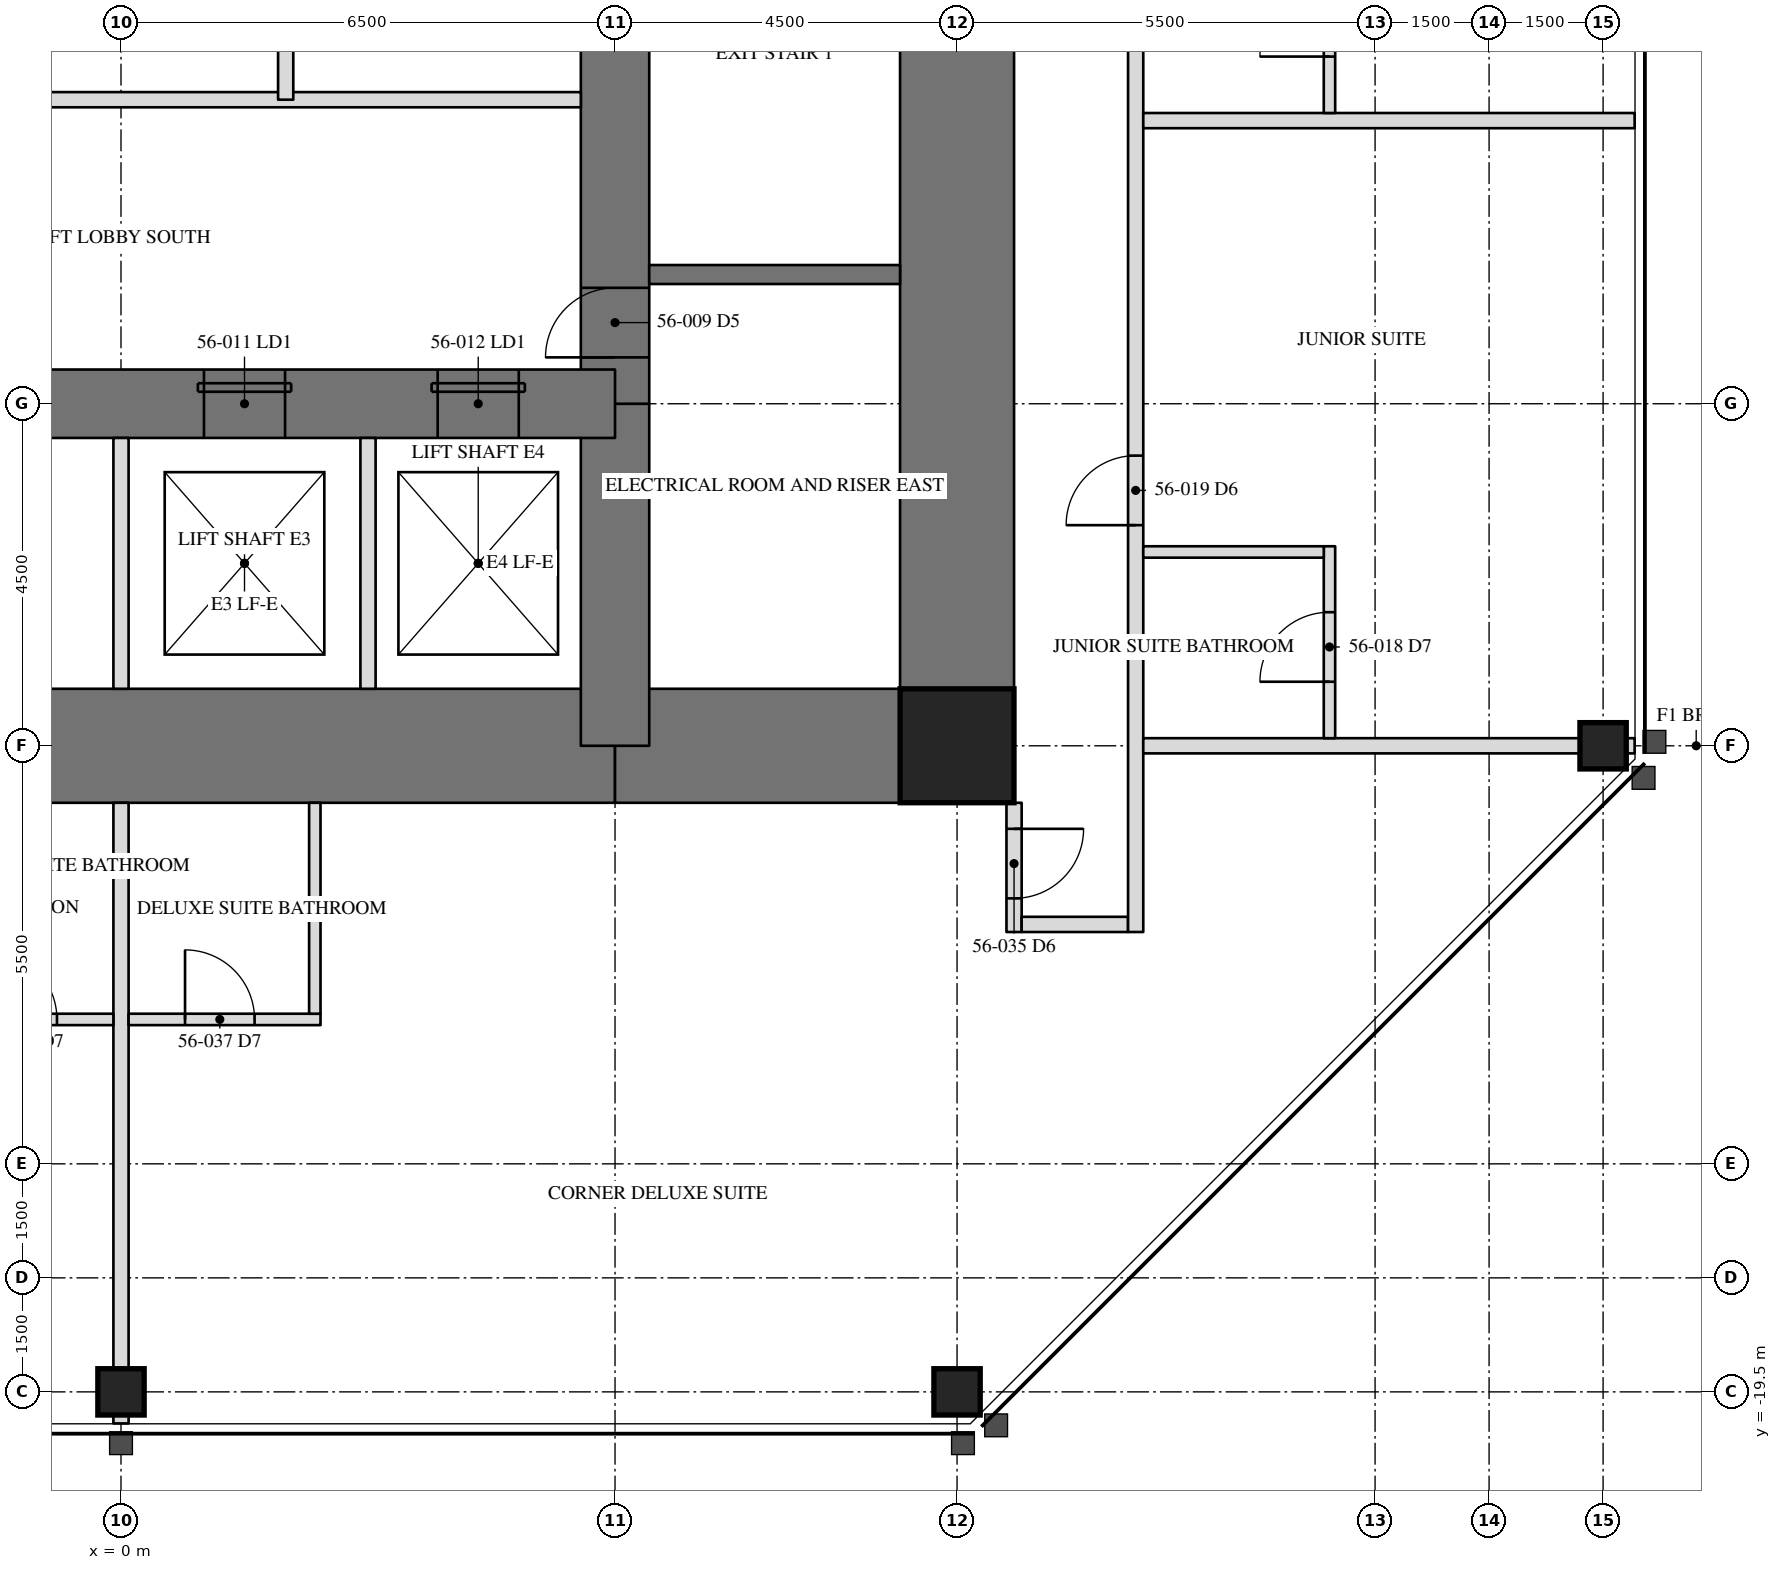
"""IFC4 building model, lengths in metres.
Left out: names, types, materials, properties, quantities, classifications, styles, units other than length and angle.
Written with IfcOpenShell. Run it as: python <this file> out.ifc"""

import sys

from ifc_helpers import new_model, si_unit, direction, frame, frame_2d, origin, origin_2d, place, context, subcontext, project, spatial, rectangle, hollow_rectangle, extrude, element, fill, save


model = new_model("IFC4")
c1 = context("Model", 3, precision=1e-05, world=origin(), true_north=direction((0.0, 1.0)))
c2 = subcontext(c1, "Body", "Model", "MODEL_VIEW")
j1 = project(units=[si_unit("LENGTHUNIT", "METRE"), si_unit("PLANEANGLEUNIT", "RADIAN")], contexts=[c1])
p1 = place(None, origin())
s1 = spatial("IfcSite", under=j1, at=p1, CompositionType="ELEMENT")
p2 = place(p1, origin())
s2 = spatial("IfcBuilding", under=s1, at=p2, CompositionType="ELEMENT")
p3 = place(p2, frame((0.0, 0.0, 232.7)))
s3 = spatial("IfcBuildingStorey", under=s2, at=p3, CompositionType="ELEMENT", Elevation=232.7)
for number, where, z_axis, x_axis in (
    (1, (0.0, -19.5, 0.0), (0.0, 0.0, 1.0), (1.0, 0.0, 0.0)),
    (2, (11.0, -19.5, 0.0), (0.0, 0.0, 1.0), (1.0, 0.0, 0.0)),
    (3, (19.5, -11.0, 0.0), (0.0, 0.0, 1.0), (0.0, 1.0, 0.0)),
):
    element("IfcColumn", number, at=place(p3, frame(where, z_axis=z_axis, x_axis=x_axis)), inside=s3, PredefinedType="COLUMN", context=c2, shape_type="SweptSolid", body=[
        extrude(hollow_rectangle(XDim=0.61, YDim=0.61, WallThickness=0.076, at=origin_2d()), origin(), (0.0, 0.0, 1.0), 3.5),
    ])
p4 = place(p3, frame((11.0, -11.0, 0.0), z_axis=(0.0, 0.0, 1.0), x_axis=(0.0, 1.0, 0.0)))
e4 = element("IfcWall", 4, at=p4, inside=s3, PredefinedType="SHEAR", context=c2, shape_type="SweptSolid", body=[
    extrude(rectangle(XDim=22.0, YDim=1.5, at=frame_2d((11.0, 0.0))), origin(), (0.0, 0.0, 1.0), 3.5),
])
p5 = place(p4, frame((15.393, 0.0, 0.0)))
e5 = element("IfcOpeningElement", 5, at=p5, cuts=e4, PredefinedType="OPENING", context=c2, shape_type="SweptSolid", body=[
    extrude(rectangle(XDim=0.915, YDim=2.134, at=frame_2d((0.458, 1.067))), frame((0.0, 0.76, 0.0), z_axis=(0.0, -1.0, 0.0), x_axis=(1.0, 0.0, 0.0)), (0.0, 0.0, 1.0), 1.52),
])
p6 = place(p3, frame((-6.5, -11.0, 0.0), z_axis=(0.0, 0.0, 1.0), x_axis=(1.0, 0.0, 0.0)))
e6 = element("IfcWall", 6, at=p6, inside=s3, PredefinedType="SHEAR", context=c2, shape_type="SweptSolid", body=[
    extrude(rectangle(XDim=13.0, YDim=1.5, at=frame_2d((6.5, 0.0))), origin(), (0.0, 0.0, 1.0), 3.5),
])
p7 = place(p3, frame((6.5, -11.0, 0.0), z_axis=(0.0, 0.0, 1.0), x_axis=(1.0, 0.0, 0.0)))
e7 = element("IfcWall", 7, at=p7, inside=s3, PredefinedType="SHEAR", context=c2, shape_type="SweptSolid", body=[
    extrude(rectangle(XDim=4.5, YDim=1.5, at=frame_2d((2.25, 0.0))), origin(), (0.0, 0.0, 1.0), 3.5),
])
p8 = place(p3, frame((6.5, -11.0, 0.0), z_axis=(0.0, 0.0, 1.0), x_axis=(0.0, 1.0, 0.0)))
e8 = element("IfcWall", 8, at=p8, inside=s3, PredefinedType="SHEAR", context=c2, shape_type="SweptSolid", body=[
    extrude(rectangle(XDim=4.5, YDim=0.9, at=frame_2d((2.25, 0.0))), origin(), (0.0, 0.0, 1.0), 3.5),
])
p9 = place(p3, frame((6.5, -6.5, 0.0), z_axis=(0.0, 0.0, 1.0), x_axis=(0.0, 1.0, 0.0)))
e9 = element("IfcWall", 9, at=p9, inside=s3, PredefinedType="SHEAR", context=c2, shape_type="SweptSolid", body=[
    extrude(rectangle(XDim=13.0, YDim=0.9, at=frame_2d((6.5, 0.0))), origin(), (0.0, 0.0, 1.0), 3.5),
])
p10 = place(p9, frame((10.893, 0.0, 0.0)))
e10 = element("IfcOpeningElement", 10, at=p10, cuts=e9, PredefinedType="OPENING", context=c2, shape_type="SweptSolid", body=[
    extrude(rectangle(XDim=0.915, YDim=2.134, at=frame_2d((0.458, 1.067))), frame((0.0, 0.46, 0.0), z_axis=(0.0, -1.0, 0.0), x_axis=(1.0, 0.0, 0.0)), (0.0, 0.0, 1.0), 0.92),
])
p11 = place(p9, frame((0.61, 0.0, 0.0)))
e11 = element("IfcOpeningElement", 11, at=p11, cuts=e9, PredefinedType="OPENING", context=c2, shape_type="SweptSolid", body=[
    extrude(rectangle(XDim=0.915, YDim=2.134, at=frame_2d((0.458, 1.067))), frame((0.0, 0.46, 0.0), z_axis=(0.0, -1.0, 0.0), x_axis=(1.0, 0.0, 0.0)), (0.0, 0.0, 1.0), 0.92),
])
p12 = place(p3, frame((-6.5, -6.5, 0.0), z_axis=(0.0, 0.0, 1.0), x_axis=(1.0, 0.0, 0.0)))
e12 = element("IfcWall", 12, at=p12, inside=s3, PredefinedType="SHEAR", context=c2, shape_type="SweptSolid", body=[
    extrude(rectangle(XDim=13.0, YDim=0.9, at=frame_2d((6.5, 0.0))), origin(), (0.0, 0.0, 1.0), 3.5),
])
p13 = place(p12, frame((7.592, 0.0, 0.0)))
e13 = element("IfcOpeningElement", 13, at=p13, cuts=e12, PredefinedType="OPENING", context=c2, shape_type="SweptSolid", body=[
    extrude(rectangle(XDim=1.067, YDim=2.134, at=frame_2d((0.533, 1.067))), frame((0.0, 0.46, 0.0), z_axis=(0.0, -1.0, 0.0), x_axis=(1.0, 0.0, 0.0)), (0.0, 0.0, 1.0), 0.92),
])
p14 = place(p12, frame((10.667, 0.0, 0.0)))
e14 = element("IfcOpeningElement", 14, at=p14, cuts=e12, PredefinedType="OPENING", context=c2, shape_type="SweptSolid", body=[
    extrude(rectangle(XDim=1.067, YDim=2.134, at=frame_2d((0.533, 1.067))), frame((0.0, 0.46, 0.0), z_axis=(0.0, -1.0, 0.0), x_axis=(1.0, 0.0, 0.0)), (0.0, 0.0, 1.0), 0.92),
])
p15 = place(p12, frame((0.667, 0.0, 0.0)))
e15 = element("IfcOpeningElement", 15, at=p15, cuts=e12, PredefinedType="OPENING", context=c2, shape_type="SweptSolid", body=[
    extrude(rectangle(XDim=0.915, YDim=2.134, at=frame_2d((0.458, 1.067))), frame((0.0, 0.46, 0.0), z_axis=(0.0, -1.0, 0.0), x_axis=(1.0, 0.0, 0.0)), (0.0, 0.0, 1.0), 0.92),
])
p16 = place(p12, frame((3.742, 0.0, 0.0)))
e16 = element("IfcOpeningElement", 16, at=p16, cuts=e12, PredefinedType="OPENING", context=c2, shape_type="SweptSolid", body=[
    extrude(rectangle(XDim=0.915, YDim=2.134, at=frame_2d((0.458, 1.067))), frame((0.0, 0.46, 0.0), z_axis=(0.0, -1.0, 0.0), x_axis=(1.0, 0.0, 0.0)), (0.0, 0.0, 1.0), 0.92),
])
p17 = place(p3, frame((11.0, -11.0, 0.0), z_axis=(0.0, 0.0, 1.0), x_axis=(1.0, 0.0, 0.0)))
e17 = element("IfcColumn", 17, at=p17, inside=s3, PredefinedType="COLUMN", context=c2, shape_type="SweptSolid", body=[
    extrude(hollow_rectangle(XDim=1.499, YDim=1.499, WallThickness=0.102, at=origin_2d()), origin(), (0.0, 0.0, 1.0), 3.5),
])
p18 = place(p3, frame((6.95, -4.8, 0.0), z_axis=(0.0, 0.0, 1.0), x_axis=(1.0, 0.0, 0.0)))
e18 = element("IfcWall", 18, at=p18, inside=s3, PredefinedType="SOLIDWALL", context=c2, shape_type="SweptSolid", body=[
    extrude(rectangle(XDim=3.3, YDim=0.25, at=frame_2d((1.65, 0.0))), origin(), (0.0, 0.0, 1.0), 3.31),
])
p19 = place(p3, frame((6.05, -2.5, 0.0), z_axis=(0.0, 0.0, 1.0), x_axis=(-1.0, 0.0, 0.0)))
e19 = element("IfcWall", 19, at=p19, inside=s3, PredefinedType="PARTITIONING", context=c2, shape_type="SweptSolid", body=[
    extrude(rectangle(XDim=12.1, YDim=0.2, at=frame_2d((6.05, 0.0))), origin(), (0.0, 0.0, 1.0), 3.31),
])
for number, where, z_axis, x_axis in (
    (20, (0.0, -10.25, 0.0), (0.0, 0.0, 1.0), (0.0, 1.0, 0.0)),
    (21, (3.25, -10.25, 0.0), (0.0, 0.0, 1.0), (0.0, 1.0, 0.0)),
):
    element("IfcWall", number, at=place(p3, frame(where, z_axis=z_axis, x_axis=x_axis)), inside=s3, PredefinedType="PARTITIONING", context=c2, shape_type="SweptSolid", body=[
        extrude(rectangle(XDim=3.3, YDim=0.2, at=frame_2d((1.65, 0.0))), origin(), (0.0, 0.0, 1.0), 3.31),
    ])
p20 = place(p3, frame((2.167, -2.5, 0.0), z_axis=(0.0, 0.0, 1.0), x_axis=(0.0, 1.0, 0.0)))
e22 = element("IfcWall", 22, at=p20, inside=s3, PredefinedType="PARTITIONING", context=c2, shape_type="SweptSolid", body=[
    extrude(rectangle(XDim=5.0, YDim=0.2, at=frame_2d((2.5, 0.0))), origin(), (0.0, 0.0, 1.0), 3.31),
])
p21 = place(p3, frame((11.75, -11.75, 0.0), z_axis=(0.0, 0.0, 1.0), x_axis=(0.0, -1.0, 0.0)))
e23 = element("IfcWall", 23, at=p21, inside=s3, PredefinedType="PARTITIONING", context=c2, shape_type="SweptSolid", body=[
    extrude(rectangle(XDim=1.7, YDim=0.2, at=frame_2d((0.85, 0.0))), origin(), (0.0, 0.0, 1.0), 3.31),
])
p22 = place(p21, frame((0.343, 0.0, 0.0)))
e24 = element("IfcOpeningElement", 24, at=p22, cuts=e23, PredefinedType="OPENING", context=c2, shape_type="SweptSolid", body=[
    extrude(rectangle(XDim=0.915, YDim=2.134, at=frame_2d((0.458, 1.067))), frame((0.0, 0.11, 0.0), z_axis=(0.0, -1.0, 0.0), x_axis=(1.0, 0.0, 0.0)), (0.0, 0.0, 1.0), 0.22),
])
p23 = place(p3, frame((11.85, -13.35, 0.0), z_axis=(0.0, 0.0, 1.0), x_axis=(1.0, 0.0, 0.0)))
e25 = element("IfcWall", 25, at=p23, inside=s3, PredefinedType="PARTITIONING", context=c2, shape_type="SweptSolid", body=[
    extrude(rectangle(XDim=1.4, YDim=0.2, at=frame_2d((0.7, 0.0))), origin(), (0.0, 0.0, 1.0), 3.31),
])
p24 = place(p3, frame((13.35, -13.45, 0.0), z_axis=(0.0, 0.0, 1.0), x_axis=(0.0, 1.0, 0.0)))
e26 = element("IfcWall", 26, at=p24, inside=s3, PredefinedType="PARTITIONING", context=c2, shape_type="SweptSolid", body=[
    extrude(rectangle(XDim=27.5, YDim=0.2, at=frame_2d((13.75, 0.0))), origin(), (0.0, 0.0, 1.0), 3.31),
])
p25 = place(p24, frame((5.353, 0.0, 0.0)))
e27 = element("IfcOpeningElement", 27, at=p25, cuts=e26, PredefinedType="OPENING", context=c2, shape_type="SweptSolid", body=[
    extrude(rectangle(XDim=0.915, YDim=2.134, at=frame_2d((0.458, 1.067))), frame((0.0, 0.11, 0.0), z_axis=(0.0, -1.0, 0.0), x_axis=(1.0, 0.0, 0.0)), (0.0, 0.0, 1.0), 0.22),
])
p26 = place(p24, frame((13.577, 0.0, 0.0)))
e28 = element("IfcOpeningElement", 28, at=p26, cuts=e26, PredefinedType="OPENING", context=c2, shape_type="SweptSolid", body=[
    extrude(rectangle(XDim=0.915, YDim=2.134, at=frame_2d((0.458, 1.067))), frame((0.0, 0.11, 0.0), z_axis=(0.0, -1.0, 0.0), x_axis=(1.0, 0.0, 0.0)), (0.0, 0.0, 1.0), 0.22),
])
p27 = place(p24, frame((21.967, 0.0, 0.0)))
e29 = element("IfcOpeningElement", 29, at=p27, cuts=e26, PredefinedType="OPENING", context=c2, shape_type="SweptSolid", body=[
    extrude(rectangle(XDim=0.915, YDim=2.134, at=frame_2d((0.458, 1.067))), frame((0.0, 0.11, 0.0), z_axis=(0.0, -1.0, 0.0), x_axis=(1.0, 0.0, 0.0)), (0.0, 0.0, 1.0), 0.22),
])
p28 = place(p3, frame((13.45, -11.0, 0.0), z_axis=(0.0, 0.0, 1.0), x_axis=(1.0, 0.0, 0.0)))
e30 = element("IfcWall", 30, at=p28, inside=s3, PredefinedType="PARTITIONING", context=c2, shape_type="SweptSolid", body=[
    extrude(rectangle(XDim=6.465, YDim=0.2, at=frame_2d((3.232, 0.0))), origin(), (0.0, 0.0, 1.0), 2.802),
])
p29 = place(p3, frame((13.45, -2.775, 0.0), z_axis=(0.0, 0.0, 1.0), x_axis=(1.0, 0.0, 0.0)))
e31 = element("IfcWall", 31, at=p29, inside=s3, PredefinedType="PARTITIONING", context=c2, shape_type="SweptSolid", body=[
    extrude(rectangle(XDim=6.465, YDim=0.2, at=frame_2d((3.232, 0.0))), origin(), (0.0, 0.0, 1.0), 3.31),
])
p30 = place(p3, frame((15.9, -10.9, 0.0), z_axis=(0.0, 0.0, 1.0), x_axis=(0.0, 1.0, 0.0)))
e32 = element("IfcWall", 32, at=p30, inside=s3, PredefinedType="PARTITIONING", context=c2, shape_type="SweptSolid", body=[
    extrude(rectangle(XDim=2.525, YDim=0.15, at=frame_2d((1.262, 0.0))), origin(), (0.0, 0.0, 1.0), 3.31),
])
p31 = place(p30, frame((0.742, 0.0, 0.0)))
e33 = element("IfcOpeningElement", 33, at=p31, cuts=e32, PredefinedType="OPENING", context=c2, shape_type="SweptSolid", body=[
    extrude(rectangle(XDim=0.915, YDim=2.032, at=frame_2d((0.458, 1.016))), frame((0.0, 0.085, 0.0), z_axis=(0.0, -1.0, 0.0), x_axis=(1.0, 0.0, 0.0)), (0.0, 0.0, 1.0), 0.17),
])
p32 = place(p3, frame((13.45, -8.45, 0.0), z_axis=(0.0, 0.0, 1.0), x_axis=(1.0, 0.0, 0.0)))
e34 = element("IfcWall", 34, at=p32, inside=s3, PredefinedType="PARTITIONING", context=c2, shape_type="SweptSolid", body=[
    extrude(rectangle(XDim=2.375, YDim=0.15, at=frame_2d((1.188, 0.0))), origin(), (0.0, 0.0, 1.0), 3.31),
])
p33 = place(p3, frame((15.9, -2.675, 0.0), z_axis=(0.0, 0.0, 1.0), x_axis=(0.0, 1.0, 0.0)))
e35 = element("IfcWall", 35, at=p33, inside=s3, PredefinedType="PARTITIONING", context=c2, shape_type="SweptSolid", body=[
    extrude(rectangle(XDim=2.525, YDim=0.15, at=frame_2d((1.263, 0.0))), origin(), (0.0, 0.0, 1.0), 3.31),
])
p34 = place(p33, frame((0.742, 0.0, 0.0)))
e36 = element("IfcOpeningElement", 36, at=p34, cuts=e35, PredefinedType="OPENING", context=c2, shape_type="SweptSolid", body=[
    extrude(rectangle(XDim=0.915, YDim=2.032, at=frame_2d((0.458, 1.016))), frame((0.0, 0.085, 0.0), z_axis=(0.0, -1.0, 0.0), x_axis=(1.0, 0.0, 0.0)), (0.0, 0.0, 1.0), 0.17),
])
p35 = place(p3, frame((0.0, -11.75, 0.0), z_axis=(0.0, 0.0, 1.0), x_axis=(0.0, -1.0, 0.0)))
e37 = element("IfcWall", 37, at=p35, inside=s3, PredefinedType="PARTITIONING", context=c2, shape_type="SweptSolid", body=[
    extrude(rectangle(XDim=8.165, YDim=0.2, at=frame_2d((4.083, 0.0))), origin(), (0.0, 0.0, 1.0), 2.802),
])
p36 = place(p3, frame((-2.625, -14.6, 0.0), z_axis=(0.0, 0.0, 1.0), x_axis=(1.0, 0.0, 0.0)))
e38 = element("IfcWall", 38, at=p36, inside=s3, PredefinedType="PARTITIONING", context=c2, shape_type="SweptSolid", body=[
    extrude(rectangle(XDim=2.525, YDim=0.15, at=frame_2d((1.262, 0.0))), origin(), (0.0, 0.0, 1.0), 3.31),
])
p37 = place(p36, frame((0.867, 0.0, 0.0)))
e39 = element("IfcOpeningElement", 39, at=p37, cuts=e38, PredefinedType="OPENING", context=c2, shape_type="SweptSolid", body=[
    extrude(rectangle(XDim=0.915, YDim=2.032, at=frame_2d((0.458, 1.016))), frame((0.0, 0.085, 0.0), z_axis=(0.0, -1.0, 0.0), x_axis=(1.0, 0.0, 0.0)), (0.0, 0.0, 1.0), 0.17),
])
p38 = place(p3, frame((0.1, -14.6, 0.0), z_axis=(0.0, 0.0, 1.0), x_axis=(1.0, 0.0, 0.0)))
e40 = element("IfcWall", 40, at=p38, inside=s3, PredefinedType="PARTITIONING", context=c2, shape_type="SweptSolid", body=[
    extrude(rectangle(XDim=2.525, YDim=0.15, at=frame_2d((1.262, 0.0))), origin(), (0.0, 0.0, 1.0), 3.31),
])
p39 = place(p38, frame((0.742, 0.0, 0.0)))
e41 = element("IfcOpeningElement", 41, at=p39, cuts=e40, PredefinedType="OPENING", context=c2, shape_type="SweptSolid", body=[
    extrude(rectangle(XDim=0.915, YDim=2.032, at=frame_2d((0.458, 1.016))), frame((0.0, 0.085, 0.0), z_axis=(0.0, -1.0, 0.0), x_axis=(1.0, 0.0, 0.0)), (0.0, 0.0, 1.0), 0.17),
])
p40 = place(p3, frame((2.55, -11.75, 0.0), z_axis=(0.0, 0.0, 1.0), x_axis=(0.0, -1.0, 0.0)))
e42 = element("IfcWall", 42, at=p40, inside=s3, PredefinedType="PARTITIONING", context=c2, shape_type="SweptSolid", body=[
    extrude(rectangle(XDim=2.775, YDim=0.15, at=frame_2d((1.387, 0.0))), origin(), (0.0, 0.0, 1.0), 3.31),
])
p41 = place(p11, origin())
e43 = element("IfcDoor", 43, at=p41, inside=s3, OperationType="SINGLE_SWING_RIGHT", PredefinedType="DOOR", context=c2, shape_type="SweptSolid", body=[
    extrude(rectangle(XDim=0.915, YDim=2.134, at=frame_2d((0.458, 1.067))), frame((0.0, -0.375, 0.0), z_axis=(0.0, -1.0, 0.0), x_axis=(1.0, 0.0, 0.0)), (0.0, 0.0, 1.0), 0.05),
])
fill(e11, e43)
p42 = place(p13, origin())
e44 = element("IfcDoor", 44, at=p42, inside=s3, OperationType="SLIDING_TO_LEFT", PredefinedType="DOOR", context=c2, shape_type="SweptSolid", body=[
    extrude(rectangle(XDim=1.067, YDim=2.134, at=frame_2d((0.533, 1.067))), frame((0.0, -0.375, 0.0), z_axis=(0.0, -1.0, 0.0), x_axis=(1.0, 0.0, 0.0)), (0.0, 0.0, 1.0), 0.05),
])
fill(e13, e44)
p43 = place(p14, origin())
e45 = element("IfcDoor", 45, at=p43, inside=s3, OperationType="SLIDING_TO_LEFT", PredefinedType="DOOR", context=c2, shape_type="SweptSolid", body=[
    extrude(rectangle(XDim=1.067, YDim=2.134, at=frame_2d((0.533, 1.067))), frame((0.0, -0.375, 0.0), z_axis=(0.0, -1.0, 0.0), x_axis=(1.0, 0.0, 0.0)), (0.0, 0.0, 1.0), 0.05),
])
fill(e14, e45)
p44 = place(p31, origin())
e46 = element("IfcDoor", 46, at=p44, inside=s3, OperationType="SINGLE_SWING_LEFT", PredefinedType="DOOR", context=c2, shape_type="SweptSolid", body=[
    extrude(rectangle(XDim=0.915, YDim=2.032, at=frame_2d((0.458, 1.016))), frame((0.0, 0.025, 0.0), z_axis=(0.0, -1.0, 0.0), x_axis=(1.0, 0.0, 0.0)), (0.0, 0.0, 1.0), 0.05),
])
fill(e33, e46)
p45 = place(p25, origin())
e47 = element("IfcDoor", 47, at=p45, inside=s3, OperationType="SINGLE_SWING_LEFT", PredefinedType="DOOR", context=c2, shape_type="SweptSolid", body=[
    extrude(rectangle(XDim=0.915, YDim=2.134, at=frame_2d((0.458, 1.067))), frame((0.0, 0.025, 0.0), z_axis=(0.0, -1.0, 0.0), x_axis=(1.0, 0.0, 0.0)), (0.0, 0.0, 1.0), 0.05),
])
fill(e27, e47)
p46 = place(p34, origin())
e48 = element("IfcDoor", 48, at=p46, inside=s3, OperationType="SINGLE_SWING_LEFT", PredefinedType="DOOR", context=c2, shape_type="SweptSolid", body=[
    extrude(rectangle(XDim=0.915, YDim=2.032, at=frame_2d((0.458, 1.016))), frame((0.0, 0.025, 0.0), z_axis=(0.0, -1.0, 0.0), x_axis=(1.0, 0.0, 0.0)), (0.0, 0.0, 1.0), 0.05),
])
fill(e36, e48)
p47 = place(p22, origin())
e49 = element("IfcDoor", 49, at=p47, inside=s3, OperationType="SINGLE_SWING_LEFT", PredefinedType="DOOR", context=c2, shape_type="SweptSolid", body=[
    extrude(rectangle(XDim=0.915, YDim=2.134, at=frame_2d((0.458, 1.067))), frame((0.0, 0.025, 0.0), z_axis=(0.0, -1.0, 0.0), x_axis=(1.0, 0.0, 0.0)), (0.0, 0.0, 1.0), 0.05),
])
fill(e24, e49)
p48 = place(p37, origin())
e50 = element("IfcDoor", 50, at=p48, inside=s3, OperationType="SINGLE_SWING_LEFT", PredefinedType="DOOR", context=c2, shape_type="SweptSolid", body=[
    extrude(rectangle(XDim=0.915, YDim=2.032, at=frame_2d((0.458, 1.016))), frame((0.0, 0.025, 0.0), z_axis=(0.0, -1.0, 0.0), x_axis=(1.0, 0.0, 0.0)), (0.0, 0.0, 1.0), 0.05),
])
fill(e39, e50)
p49 = place(p39, origin())
e51 = element("IfcDoor", 51, at=p49, inside=s3, OperationType="SINGLE_SWING_LEFT", PredefinedType="DOOR", context=c2, shape_type="SweptSolid", body=[
    extrude(rectangle(XDim=0.915, YDim=2.032, at=frame_2d((0.458, 1.016))), frame((0.0, 0.025, 0.0), z_axis=(0.0, -1.0, 0.0), x_axis=(1.0, 0.0, 0.0)), (0.0, 0.0, 1.0), 0.05),
])
fill(e41, e51)
save(model, sys.argv[1])
